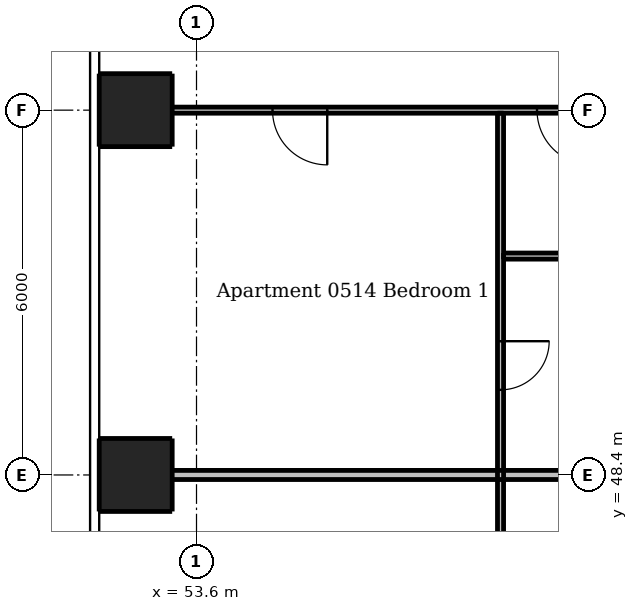
"""IFC4 building model, lengths in metres.
Left out: names, types, materials, properties, quantities, classifications, styles, units other than length and angle.
Written with IfcOpenShell. Run it as: python <this file> out.ifc"""

import sys

from ifc_helpers import new_model, si_unit, direction, frame, frame_2d, origin, origin_2d, place, context, subcontext, project, spatial, rectangle, extrude, element, fill, save


model = new_model("IFC4")
c1 = context("Model", 3, precision=1e-05, world=origin(), true_north=direction((0.0, 1.0)))
c2 = subcontext(c1, "Body", "Model", "MODEL_VIEW")
j1 = project(units=[si_unit("LENGTHUNIT", "METRE"), si_unit("PLANEANGLEUNIT", "RADIAN")], contexts=[c1])
p1 = place(None, origin())
s1 = spatial("IfcSite", under=j1, at=p1, CompositionType="ELEMENT")
p2 = place(p1, origin())
s2 = spatial("IfcBuilding", under=s1, at=p2, CompositionType="ELEMENT")
p3 = place(p2, frame((0.0, 0.0, 23.5)))
s3 = spatial("IfcBuildingStorey", under=s2, at=p3, CompositionType="ELEMENT", Elevation=23.5)
for number, where, z_axis, x_axis in (
    (1, (52.6, 48.4, 0.0), (0.0, 0.0, 1.0), (1.0, 0.0, 0.0)),
    (2, (52.6, 54.4, 0.0), (0.0, 0.0, 1.0), (1.0, 0.0, 0.0)),
):
    element("IfcColumn", number, at=place(p3, frame(where, z_axis=z_axis, x_axis=x_axis)), inside=s3, PredefinedType="COLUMN", context=c2, shape_type="SweptSolid", body=[
        extrude(rectangle(XDim=1.2, YDim=1.2, at=origin_2d()), origin(), (0.0, 0.0, 1.0), 3.05),
    ])
p4 = place(p3, frame((58.6, 54.35, 0.0), z_axis=(0.0, 0.0, 1.0), x_axis=(0.0, -1.0, 0.0)))
e3 = element("IfcWall", 3, at=p4, inside=s3, PredefinedType="PARTITIONING", context=c2, shape_type="SweptSolid", body=[
    extrude(rectangle(XDim=8.1, YDim=0.1, at=frame_2d((4.05, 0.0))), origin(), (0.0, 0.0, 1.0), 3.05),
])
p5 = place(p4, frame((3.75, 0.0, 0.0)))
e4 = element("IfcOpeningElement", 4, at=p5, cuts=e3, PredefinedType="OPENING", context=c2, shape_type="SweptSolid", body=[
    extrude(rectangle(XDim=0.8, YDim=2.1, at=frame_2d((0.4, 1.05))), frame((0.0, 0.06, 0.0), z_axis=(0.0, -1.0, 0.0), x_axis=(1.0, 0.0, 0.0)), (0.0, 0.0, 1.0), 0.12),
])
p6 = place(p3, frame((60.625, 54.4, 0.0), z_axis=(0.0, 0.0, 1.0), x_axis=(-1.0, 0.0, 0.0)))
e5 = element("IfcWall", 5, at=p6, inside=s3, PredefinedType="PARTITIONING", context=c2, shape_type="SweptSolid", body=[
    extrude(rectangle(XDim=8.625, YDim=0.1, at=frame_2d((4.312, 0.0))), origin(), (0.0, 0.0, 1.0), 2.516),
])
p7 = place(p6, frame((0.525, 0.0, 0.0)))
e6 = element("IfcOpeningElement", 6, at=p7, cuts=e5, PredefinedType="OPENING", context=c2, shape_type="SweptSolid", body=[
    extrude(rectangle(XDim=0.9, YDim=2.1, at=frame_2d((0.45, 1.05))), frame((0.0, 0.06, 0.0), z_axis=(0.0, -1.0, 0.0), x_axis=(1.0, 0.0, 0.0)), (0.0, 0.0, 1.0), 0.12),
])
p8 = place(p6, frame((4.875, 0.0, 0.0)))
e7 = element("IfcOpeningElement", 7, at=p8, cuts=e5, PredefinedType="OPENING", context=c2, shape_type="SweptSolid", body=[
    extrude(rectangle(XDim=0.9, YDim=2.1, at=frame_2d((0.45, 1.05))), frame((0.0, 0.06, 0.0), z_axis=(0.0, -1.0, 0.0), x_axis=(1.0, 0.0, 0.0)), (0.0, 0.0, 1.0), 0.12),
])
p9 = place(p3, frame((58.65, 52.0, 0.0), z_axis=(0.0, 0.0, 1.0), x_axis=(1.0, 0.0, 0.0)))
e8 = element("IfcWall", 8, at=p9, inside=s3, PredefinedType="PARTITIONING", context=c2, shape_type="SweptSolid", body=[
    extrude(rectangle(XDim=1.975, YDim=0.1, at=frame_2d((0.988, 0.0))), origin(), (0.0, 0.0, 1.0), 3.05),
])
p10 = place(p3, frame((52.0, 48.4, 0.0), z_axis=(0.0, 0.0, 1.0), x_axis=(1.0, 0.0, 0.0)))
e9 = element("IfcWall", 9, at=p10, inside=s3, PredefinedType="PARTITIONING", context=c2, shape_type="SweptSolid", body=[
    extrude(rectangle(XDim=8.625, YDim=0.15, at=frame_2d((4.312, 0.0))), origin(), (0.0, 0.0, 1.0), 2.516),
])
p11 = place(p3, frame((51.5, 46.175, 0.0), z_axis=(0.0, 0.0, 1.0), x_axis=(0.0, 1.0, 0.0)))
e10 = element("IfcWall", 10, at=p11, inside=s3, PredefinedType="PARAPET", context=c2, shape_type="SweptSolid", body=[
    extrude(rectangle(XDim=14.85, YDim=0.2, at=frame_2d((7.425, 0.0))), origin(), (0.0, 0.0, 1.0), 1.1),
])
p12 = place(p7, origin())
e11 = element("IfcDoor", 11, at=p12, inside=s3, OperationType="SINGLE_SWING_LEFT", PredefinedType="DOOR", context=c2, shape_type="SweptSolid", body=[
    extrude(rectangle(XDim=0.9, YDim=2.1, at=frame_2d((0.45, 1.05))), frame((0.0, 0.025, 0.0), z_axis=(0.0, -1.0, 0.0), x_axis=(1.0, 0.0, 0.0)), (0.0, 0.0, 1.0), 0.05),
])
fill(e6, e11)
p13 = place(p8, origin())
e12 = element("IfcDoor", 12, at=p13, inside=s3, OperationType="SINGLE_SWING_LEFT", PredefinedType="DOOR", context=c2, shape_type="SweptSolid", body=[
    extrude(rectangle(XDim=0.9, YDim=2.1, at=frame_2d((0.45, 1.05))), frame((0.0, 0.025, 0.0), z_axis=(0.0, -1.0, 0.0), x_axis=(1.0, 0.0, 0.0)), (0.0, 0.0, 1.0), 0.05),
])
fill(e7, e12)
p14 = place(p5, origin())
e13 = element("IfcDoor", 13, at=p14, inside=s3, OperationType="SINGLE_SWING_LEFT", PredefinedType="DOOR", context=c2, shape_type="SweptSolid", body=[
    extrude(rectangle(XDim=0.8, YDim=2.1, at=frame_2d((0.4, 1.05))), frame((0.0, 0.025, 0.0), z_axis=(0.0, -1.0, 0.0), x_axis=(1.0, 0.0, 0.0)), (0.0, 0.0, 1.0), 0.05),
])
fill(e4, e13)
save(model, sys.argv[1])
